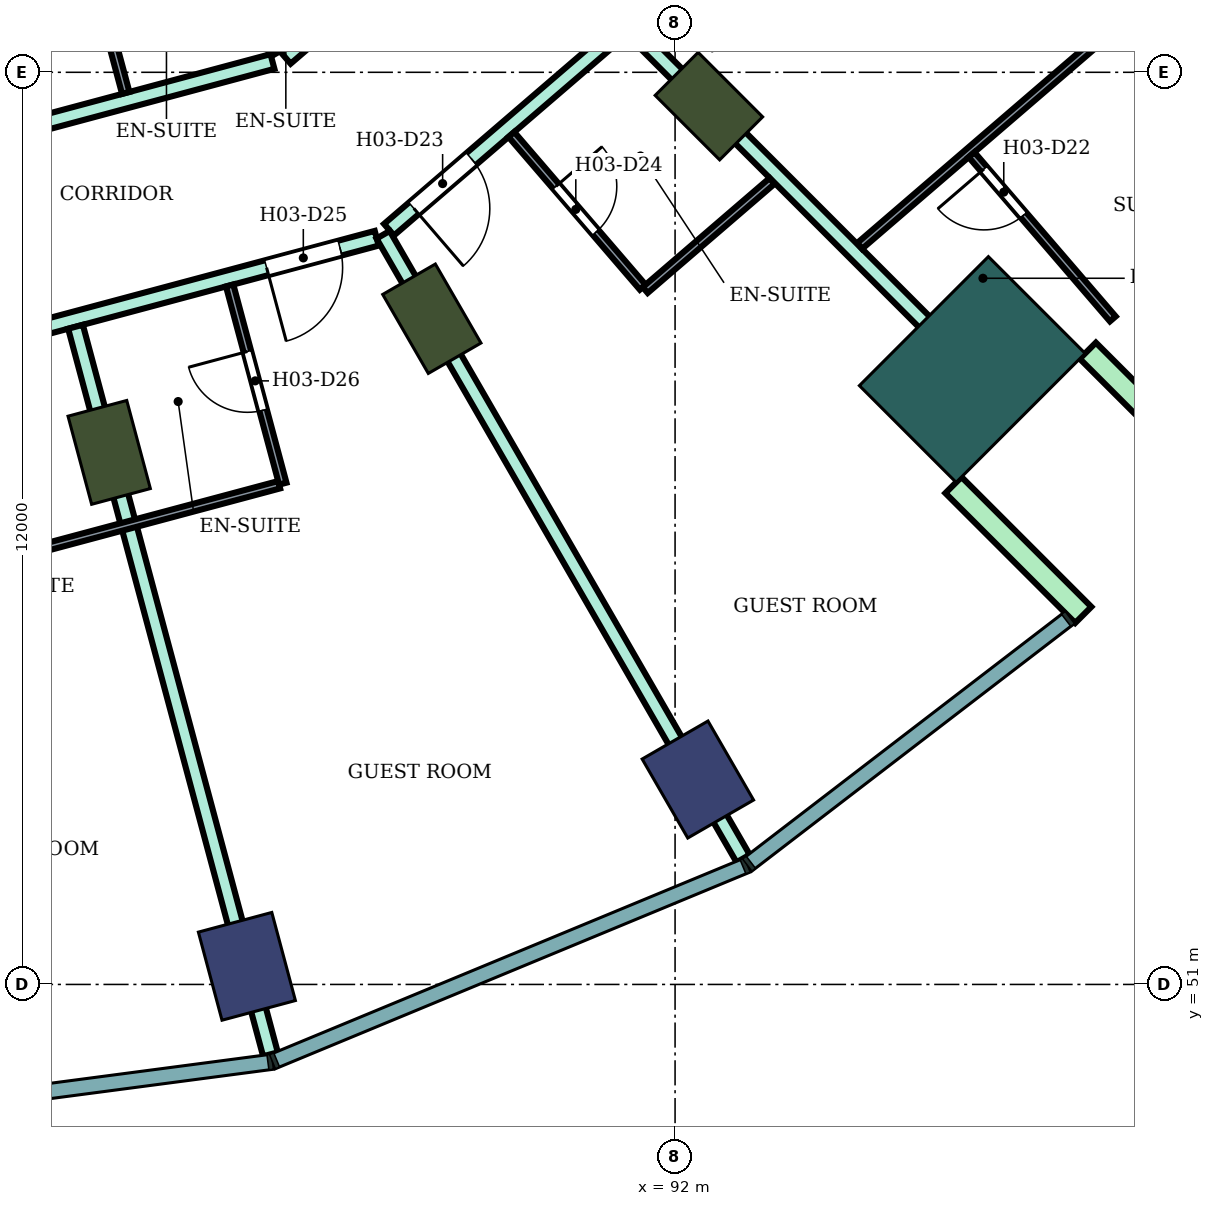
"""IFC4 building model, lengths in metres.
Left out: names, types, materials, properties, quantities, classifications, styles, units other than length and angle.
Written with IfcOpenShell. Run it as: python <this file> out.ifc"""

import sys

from ifc_helpers import new_model, si_unit, direction, frame, frame_2d, origin, origin_2d, place, context, subcontext, project, spatial, rectangle, extrude, element, fill, save


model = new_model("IFC4")
c1 = context("Model", 3, precision=1e-05, world=origin(), true_north=direction((0.0, 1.0)))
c2 = subcontext(c1, "Body", "Model", "MODEL_VIEW")
j1 = project(units=[si_unit("LENGTHUNIT", "METRE"), si_unit("PLANEANGLEUNIT", "RADIAN")], contexts=[c1])
p1 = place(None, origin())
s1 = spatial("IfcSite", under=j1, at=p1, CompositionType="ELEMENT")
p2 = place(p1, origin())
s2 = spatial("IfcBuilding", under=s1, at=p2, CompositionType="ELEMENT")
p3 = place(p2, frame((0.0, 0.0, 51.6)))
s3 = spatial("IfcBuildingStorey", under=s2, at=p3, CompositionType="ELEMENT", Elevation=51.6)
for number, where, z_axis, x_axis in (
    (1, (86.367, 51.238, 0.0), (0.0, 0.0, 1.0), (0.259, -0.966, 0.0)),
    (2, (92.3, 53.696, 0.0), (0.0, 0.0, 1.0), (0.5, -0.866, 0.0)),
):
    element("IfcColumn", number, at=place(p3, frame(where, z_axis=z_axis, x_axis=x_axis)), inside=s3, PredefinedType="COLUMN", context=c2, shape_type="SweptSolid", body=[
        extrude(rectangle(XDim=1.2, YDim=1.0, at=origin_2d()), origin(), (0.0, 0.0, 1.0), 3.8),
    ])
for number, where, z_axis, x_axis in (
    (3, (84.555, 58.0, 0.0), (0.0, 0.0, 1.0), (0.259, -0.966, 0.0)),
    (4, (88.8, 59.758, 0.0), (0.0, 0.0, 1.0), (0.5, -0.866, 0.0)),
    (5, (92.445, 62.555, 0.0), (0.0, 0.0, 1.0), (0.707, -0.707, 0.0)),
):
    element("IfcColumn", number, at=place(p3, frame(where, z_axis=z_axis, x_axis=x_axis)), inside=s3, PredefinedType="COLUMN", context=c2, shape_type="SweptSolid", body=[
        extrude(rectangle(XDim=1.2, YDim=0.8, at=origin_2d()), origin(), (0.0, 0.0, 1.0), 3.8),
    ])
p4 = place(p3, frame((95.91, 59.09, 0.0), z_axis=(0.0, 0.0, 1.0), x_axis=(0.707106781187, -0.707106781187, 0.0)))
e6 = element("IfcColumn", 6, at=p4, inside=s3, PredefinedType="COLUMN", context=c2, shape_type="SweptSolid", body=[
    extrude(rectangle(XDim=1.8, YDim=2.4, at=origin_2d()), origin(), (0.0, 0.0, 1.0), 3.8),
])
for number, where, z_axis, x_axis in (
    (7, (95.662, 57.57, 0.0), (0.0, 0.0, 1.0), (0.707, -0.707, 0.0)),
    (8, (97.43, 59.338, 0.0), (0.0, 0.0, 1.0), (0.707, -0.707, 0.0)),
):
    element("IfcWall", number, at=place(p3, frame(where, z_axis=z_axis, x_axis=x_axis)), inside=s3, PredefinedType="NOTDEFINED", context=c2, shape_type="SweptSolid", body=[
        extrude(rectangle(XDim=2.416, YDim=0.3, at=frame_2d((1.208, 0.0))), origin(), (0.0, 0.0, 1.0), 3.8),
    ])
p5 = place(p3, frame((80.0, 58.655, 0.0), z_axis=(0.0, 0.0, 1.0), x_axis=(0.965974635626, 0.258636817424, 0.0)))
e9 = element("IfcWall", 9, at=p5, inside=s3, PredefinedType="PARTITIONING", context=c2, shape_type="SweptSolid", body=[
    extrude(rectangle(XDim=8.36, YDim=0.2, at=frame_2d((4.18, 0.0))), origin(), (0.0, 0.0, 1.0), 3.35),
])
p6 = place(p5, frame((6.86, 0.0, 0.0)))
e10 = element("IfcOpeningElement", 10, at=p6, cuts=e9, PredefinedType="OPENING", context=c2, shape_type="SweptSolid", body=[
    extrude(rectangle(XDim=1.0, YDim=2.1, at=frame_2d((0.5, 1.05))), frame((0.0, 0.11, 0.0), z_axis=(0.0, -1.0, 0.0), x_axis=(1.0, 0.0, 0.0)), (0.0, 0.0, 1.0), 0.22),
])
p7 = place(p5, frame((0.55, 0.0, 0.0)))
e11 = element("IfcOpeningElement", 11, at=p7, cuts=e9, PredefinedType="OPENING", context=c2, shape_type="SweptSolid", body=[
    extrude(rectangle(XDim=1.0, YDim=2.1, at=frame_2d((0.5, 1.05))), frame((0.0, 0.11, 0.0), z_axis=(0.0, -1.0, 0.0), x_axis=(1.0, 0.0, 0.0)), (0.0, 0.0, 1.0), 0.22),
])
p8 = place(p3, frame((80.0, 61.346, 0.0), z_axis=(0.0, 0.0, 1.0), x_axis=(0.965924181808, 0.258825182312, 0.0)))
e12 = element("IfcWall", 12, at=p8, inside=s3, PredefinedType="PARTITIONING", context=c2, shape_type="SweptSolid", body=[
    extrude(rectangle(XDim=6.94, YDim=0.2, at=frame_2d((3.47, 0.0))), origin(), (0.0, 0.0, 1.0), 3.35),
])
p9 = place(p8, frame((0.55, 0.0, 0.0)))
e13 = element("IfcOpeningElement", 13, at=p9, cuts=e12, PredefinedType="OPENING", context=c2, shape_type="SweptSolid", body=[
    extrude(rectangle(XDim=1.0, YDim=2.1, at=frame_2d((0.5, 1.05))), frame((0.0, 0.11, 0.0), z_axis=(0.0, -1.0, 0.0), x_axis=(1.0, 0.0, 0.0)), (0.0, 0.0, 1.0), 0.22),
])
p10 = place(p3, frame((83.848, 68.332, 0.0), z_axis=(0.0, 0.0, 1.0), x_axis=(0.499901724708, -0.866082135617, 0.0)))
e14 = element("IfcWall", 14, at=p10, inside=s3, PredefinedType="PARTITIONING", context=c2, shape_type="SweptSolid", body=[
    extrude(rectangle(XDim=5.855, YDim=0.2, at=frame_2d((2.928, 0.0))), origin(), (0.0, 0.0, 1.0), 3.35),
])
p11 = place(p3, frame((84.112, 59.652, 0.0), z_axis=(0.0, 0.0, 1.0), x_axis=(0.258843225553, -0.965919346832, 0.0)))
e15 = element("IfcWall", 15, at=p11, inside=s3, PredefinedType="PARTITIONING", context=c2, shape_type="SweptSolid", body=[
    extrude(rectangle(XDim=9.909, YDim=0.2, at=frame_2d((4.955, 0.0))), origin(), (0.0, 0.0, 1.0), 3.35),
])
p12 = place(p3, frame((86.877, 63.189, 0.0), z_axis=(0.0, 0.0, 1.0), x_axis=(0.758164888471, 0.652062881853, 0.0)))
e16 = element("IfcWall", 16, at=p12, inside=s3, PredefinedType="PARTITIONING", context=c2, shape_type="SweptSolid", body=[
    extrude(rectangle(XDim=5.23, YDim=0.2, at=frame_2d((2.615, 0.0))), origin(), (0.0, 0.0, 1.0), 3.35),
])
p13 = place(p12, frame((2.63, 0.0, 0.0)))
e17 = element("IfcOpeningElement", 17, at=p13, cuts=e16, PredefinedType="OPENING", context=c2, shape_type="SweptSolid", body=[
    extrude(rectangle(XDim=1.0, YDim=2.1, at=frame_2d((0.5, 1.05))), frame((0.0, 0.11, 0.0), z_axis=(0.0, -1.0, 0.0), x_axis=(1.0, 0.0, 0.0)), (0.0, 0.0, 1.0), 0.22),
])
p14 = place(p3, frame((88.236, 60.929, 0.0), z_axis=(0.0, 0.0, 1.0), x_axis=(0.758227485202, 0.651990092474, 0.0)))
e18 = element("IfcWall", 18, at=p14, inside=s3, PredefinedType="PARTITIONING", context=c2, shape_type="SweptSolid", body=[
    extrude(rectangle(XDim=6.336, YDim=0.2, at=frame_2d((3.168, 0.0))), origin(), (0.0, 0.0, 1.0), 3.35),
])
p15 = place(p14, frame((4.757, 0.0, 0.0)))
e19 = element("IfcOpeningElement", 19, at=p15, cuts=e18, PredefinedType="OPENING", context=c2, shape_type="SweptSolid", body=[
    extrude(rectangle(XDim=1.0, YDim=2.1, at=frame_2d((0.5, 1.05))), frame((0.0, 0.11, 0.0), z_axis=(0.0, -1.0, 0.0), x_axis=(1.0, 0.0, 0.0)), (0.0, 0.0, 1.0), 0.22),
])
p16 = place(p14, frame((0.43, 0.0, 0.0)))
e20 = element("IfcOpeningElement", 20, at=p16, cuts=e18, PredefinedType="OPENING", context=c2, shape_type="SweptSolid", body=[
    extrude(rectangle(XDim=1.0, YDim=2.1, at=frame_2d((0.5, 1.05))), frame((0.0, 0.11, 0.0), z_axis=(0.0, -1.0, 0.0), x_axis=(1.0, 0.0, 0.0)), (0.0, 0.0, 1.0), 0.22),
])
p17 = place(p3, frame((88.159, 60.863, 0.0), z_axis=(0.0, 0.0, 1.0), x_axis=(0.499886028459, -0.866091195286, 0.0)))
e21 = element("IfcWall", 21, at=p17, inside=s3, PredefinedType="PARTITIONING", context=c2, shape_type="SweptSolid", body=[
    extrude(rectangle(XDim=9.475, YDim=0.2, at=frame_2d((4.737, 0.0))), origin(), (0.0, 0.0, 1.0), 3.35),
])
p18 = place(p3, frame((91.449, 63.548, 0.0), z_axis=(0.0, 0.0, 1.0), x_axis=(0.706984810649, -0.707228730688, 0.0)))
e22 = element("IfcWall", 22, at=p18, inside=s3, PredefinedType="PARTITIONING", context=c2, shape_type="SweptSolid", body=[
    extrude(rectangle(XDim=7.006, YDim=0.2, at=frame_2d((3.503, 0.0))), origin(), (0.0, 0.0, 1.0), 3.35),
])
p19 = place(p3, frame((82.782, 56.501, 0.0), z_axis=(0.0, 0.0, 1.0), x_axis=(0.965999228418, 0.258544949083, 0.0)))
e23 = element("IfcWall", 23, at=p19, inside=s3, PredefinedType="PARTITIONING", context=c2, shape_type="SweptSolid", body=[
    extrude(rectangle(XDim=4.15, YDim=0.1, at=frame_2d((2.075, 0.0))), origin(), (0.0, 0.0, 1.0), 3.35),
])
p20 = place(p3, frame((84.087, 65.289, 0.0), z_axis=(0.0, 0.0, 1.0), x_axis=(0.258929459649, -0.965896234037, 0.0)))
e24 = element("IfcWall", 24, at=p20, inside=s3, PredefinedType="PARTITIONING", context=c2, shape_type="SweptSolid", body=[
    extrude(rectangle(XDim=2.65, YDim=0.1, at=frame_2d((1.325, 0.0))), origin(), (0.0, 0.0, 1.0), 3.35),
])
p21 = place(p20, frame((0.95, 0.0, 0.0)))
e25 = element("IfcOpeningElement", 25, at=p21, cuts=e24, PredefinedType="OPENING", context=c2, shape_type="SweptSolid", body=[
    extrude(rectangle(XDim=0.8, YDim=2.1, at=frame_2d((0.4, 1.05))), frame((0.0, 0.06, 0.0), z_axis=(0.0, -1.0, 0.0), x_axis=(1.0, 0.0, 0.0)), (0.0, 0.0, 1.0), 0.12),
])
p22 = place(p3, frame((86.14, 60.196, 0.0), z_axis=(0.0, 0.0, 1.0), x_axis=(0.258945475746, -0.965891940432, 0.0)))
e26 = element("IfcWall", 26, at=p22, inside=s3, PredefinedType="PARTITIONING", context=c2, shape_type="SweptSolid", body=[
    extrude(rectangle(XDim=2.7, YDim=0.1, at=frame_2d((1.35, 0.0))), origin(), (0.0, 0.0, 1.0), 3.35),
])
p23 = place(p22, frame((0.9, 0.0, 0.0)))
e27 = element("IfcOpeningElement", 27, at=p23, cuts=e26, PredefinedType="OPENING", context=c2, shape_type="SweptSolid", body=[
    extrude(rectangle(XDim=0.8, YDim=2.1, at=frame_2d((0.4, 1.05))), frame((0.0, 0.06, 0.0), z_axis=(0.0, -1.0, 0.0), x_axis=(1.0, 0.0, 0.0)), (0.0, 0.0, 1.0), 0.12),
])
p24 = place(p3, frame((89.846, 62.182, 0.0), z_axis=(0.0, 0.0, 1.0), x_axis=(0.652095405055, -0.758136915541, 0.0)))
e28 = element("IfcWall", 28, at=p24, inside=s3, PredefinedType="PARTITIONING", context=c2, shape_type="SweptSolid", body=[
    extrude(rectangle(XDim=2.65, YDim=0.1, at=frame_2d((1.325, 0.0))), origin(), (0.0, 0.0, 1.0), 3.35),
])
p25 = place(p24, frame((0.9, 0.0, 0.0)))
e29 = element("IfcOpeningElement", 29, at=p25, cuts=e28, PredefinedType="OPENING", context=c2, shape_type="SweptSolid", body=[
    extrude(rectangle(XDim=0.8, YDim=2.1, at=frame_2d((0.4, 1.05))), frame((0.0, 0.06, 0.0), z_axis=(0.0, -1.0, 0.0), x_axis=(1.0, 0.0, 0.0)), (0.0, 0.0, 1.0), 0.12),
])
p26 = place(p3, frame((91.607, 60.135, 0.0), z_axis=(0.0, 0.0, 1.0), x_axis=(0.758135842672, 0.652096652388, 0.0)))
e30 = element("IfcWall", 30, at=p26, inside=s3, PredefinedType="PARTITIONING", context=c2, shape_type="SweptSolid", body=[
    extrude(rectangle(XDim=2.201, YDim=0.1, at=frame_2d((1.101, 0.0))), origin(), (0.0, 0.0, 1.0), 3.35),
])
p27 = place(p3, frame((94.428, 60.715, 0.0), z_axis=(0.0, 0.0, 1.0), x_axis=(0.758117248367, 0.65211826974, 0.0)))
e31 = element("IfcWall", 31, at=p27, inside=s3, PredefinedType="PARTITIONING", context=c2, shape_type="SweptSolid", body=[
    extrude(rectangle(XDim=9.024, YDim=0.1, at=frame_2d((4.512, 0.0))), origin(), (0.0, 0.0, 1.0), 3.35),
])
p28 = place(p27, frame((5.002, 0.0, 0.0)))
e32 = element("IfcOpeningElement", 32, at=p28, cuts=e31, PredefinedType="OPENING", context=c2, shape_type="SweptSolid", body=[
    extrude(rectangle(XDim=0.9, YDim=2.1, at=frame_2d((0.45, 1.05))), frame((0.0, 0.06, 0.0), z_axis=(0.0, -1.0, 0.0), x_axis=(1.0, 0.0, 0.0)), (0.0, 0.0, 1.0), 0.12),
])
p29 = place(p3, frame((95.901, 61.916, 0.0), z_axis=(0.0, 0.0, 1.0), x_axis=(0.652215581117, -0.758033532074, 0.0)))
e33 = element("IfcWall", 33, at=p29, inside=s3, PredefinedType="PARTITIONING", context=c2, shape_type="SweptSolid", body=[
    extrude(rectangle(XDim=2.849, YDim=0.1, at=frame_2d((1.425, 0.0))), origin(), (0.0, 0.0, 1.0), 3.35),
])
p30 = place(p29, frame((0.25, 0.0, 0.0)))
e34 = element("IfcOpeningElement", 34, at=p30, cuts=e33, PredefinedType="OPENING", context=c2, shape_type="SweptSolid", body=[
    extrude(rectangle(XDim=0.8, YDim=2.1, at=frame_2d((0.4, 1.05))), frame((0.0, 0.06, 0.0), z_axis=(0.0, -1.0, 0.0), x_axis=(1.0, 0.0, 0.0)), (0.0, 0.0, 1.0), 0.12),
])
p31 = place(p30, frame((0.8, 0.0, 0.0), z_axis=(0.0, 0.0, 1.0), x_axis=(-1.0, 0.0, 0.0)))
e35 = element("IfcDoor", 35, at=p31, inside=s3, OperationType="SINGLE_SWING_RIGHT", PredefinedType="DOOR", context=c2, shape_type="SweptSolid", body=[
    extrude(rectangle(XDim=0.8, YDim=2.1, at=frame_2d((0.4, 1.05))), frame((0.0, 0.025, 0.0), z_axis=(0.0, -1.0, 0.0), x_axis=(1.0, 0.0, 0.0)), (0.0, 0.0, 1.0), 0.05),
])
fill(e34, e35)
p32 = place(p16, frame((1.0, 0.0, 0.0), z_axis=(0.0, 0.0, 1.0), x_axis=(-1.0, 0.0, 0.0)))
e36 = element("IfcDoor", 36, at=p32, inside=s3, OperationType="SINGLE_SWING_RIGHT", PredefinedType="DOOR", context=c2, shape_type="SweptSolid", body=[
    extrude(rectangle(XDim=1.0, YDim=2.1, at=frame_2d((0.5, 1.05))), frame((0.0, 0.025, 0.0), z_axis=(0.0, -1.0, 0.0), x_axis=(1.0, 0.0, 0.0)), (0.0, 0.0, 1.0), 0.05),
])
fill(e20, e36)
p33 = place(p25, origin())
e37 = element("IfcDoor", 37, at=p33, inside=s3, OperationType="SINGLE_SWING_LEFT", PredefinedType="DOOR", context=c2, shape_type="SweptSolid", body=[
    extrude(rectangle(XDim=0.8, YDim=2.1, at=frame_2d((0.4, 1.05))), frame((0.0, 0.025, 0.0), z_axis=(0.0, -1.0, 0.0), x_axis=(1.0, 0.0, 0.0)), (0.0, 0.0, 1.0), 0.05),
])
fill(e29, e37)
p34 = place(p6, frame((1.0, 0.0, 0.0), z_axis=(0.0, 0.0, 1.0), x_axis=(-1.0, 0.0, 0.0)))
e38 = element("IfcDoor", 38, at=p34, inside=s3, OperationType="SINGLE_SWING_RIGHT", PredefinedType="DOOR", context=c2, shape_type="SweptSolid", body=[
    extrude(rectangle(XDim=1.0, YDim=2.1, at=frame_2d((0.5, 1.05))), frame((0.0, 0.025, 0.0), z_axis=(0.0, -1.0, 0.0), x_axis=(1.0, 0.0, 0.0)), (0.0, 0.0, 1.0), 0.05),
])
fill(e10, e38)
p35 = place(p23, frame((0.8, 0.0, 0.0), z_axis=(0.0, 0.0, 1.0), x_axis=(-1.0, 0.0, 0.0)))
e39 = element("IfcDoor", 39, at=p35, inside=s3, OperationType="SINGLE_SWING_RIGHT", PredefinedType="DOOR", context=c2, shape_type="SweptSolid", body=[
    extrude(rectangle(XDim=0.8, YDim=2.1, at=frame_2d((0.4, 1.05))), frame((0.0, 0.025, 0.0), z_axis=(0.0, -1.0, 0.0), x_axis=(1.0, 0.0, 0.0)), (0.0, 0.0, 1.0), 0.05),
])
fill(e27, e39)
save(model, sys.argv[1])
